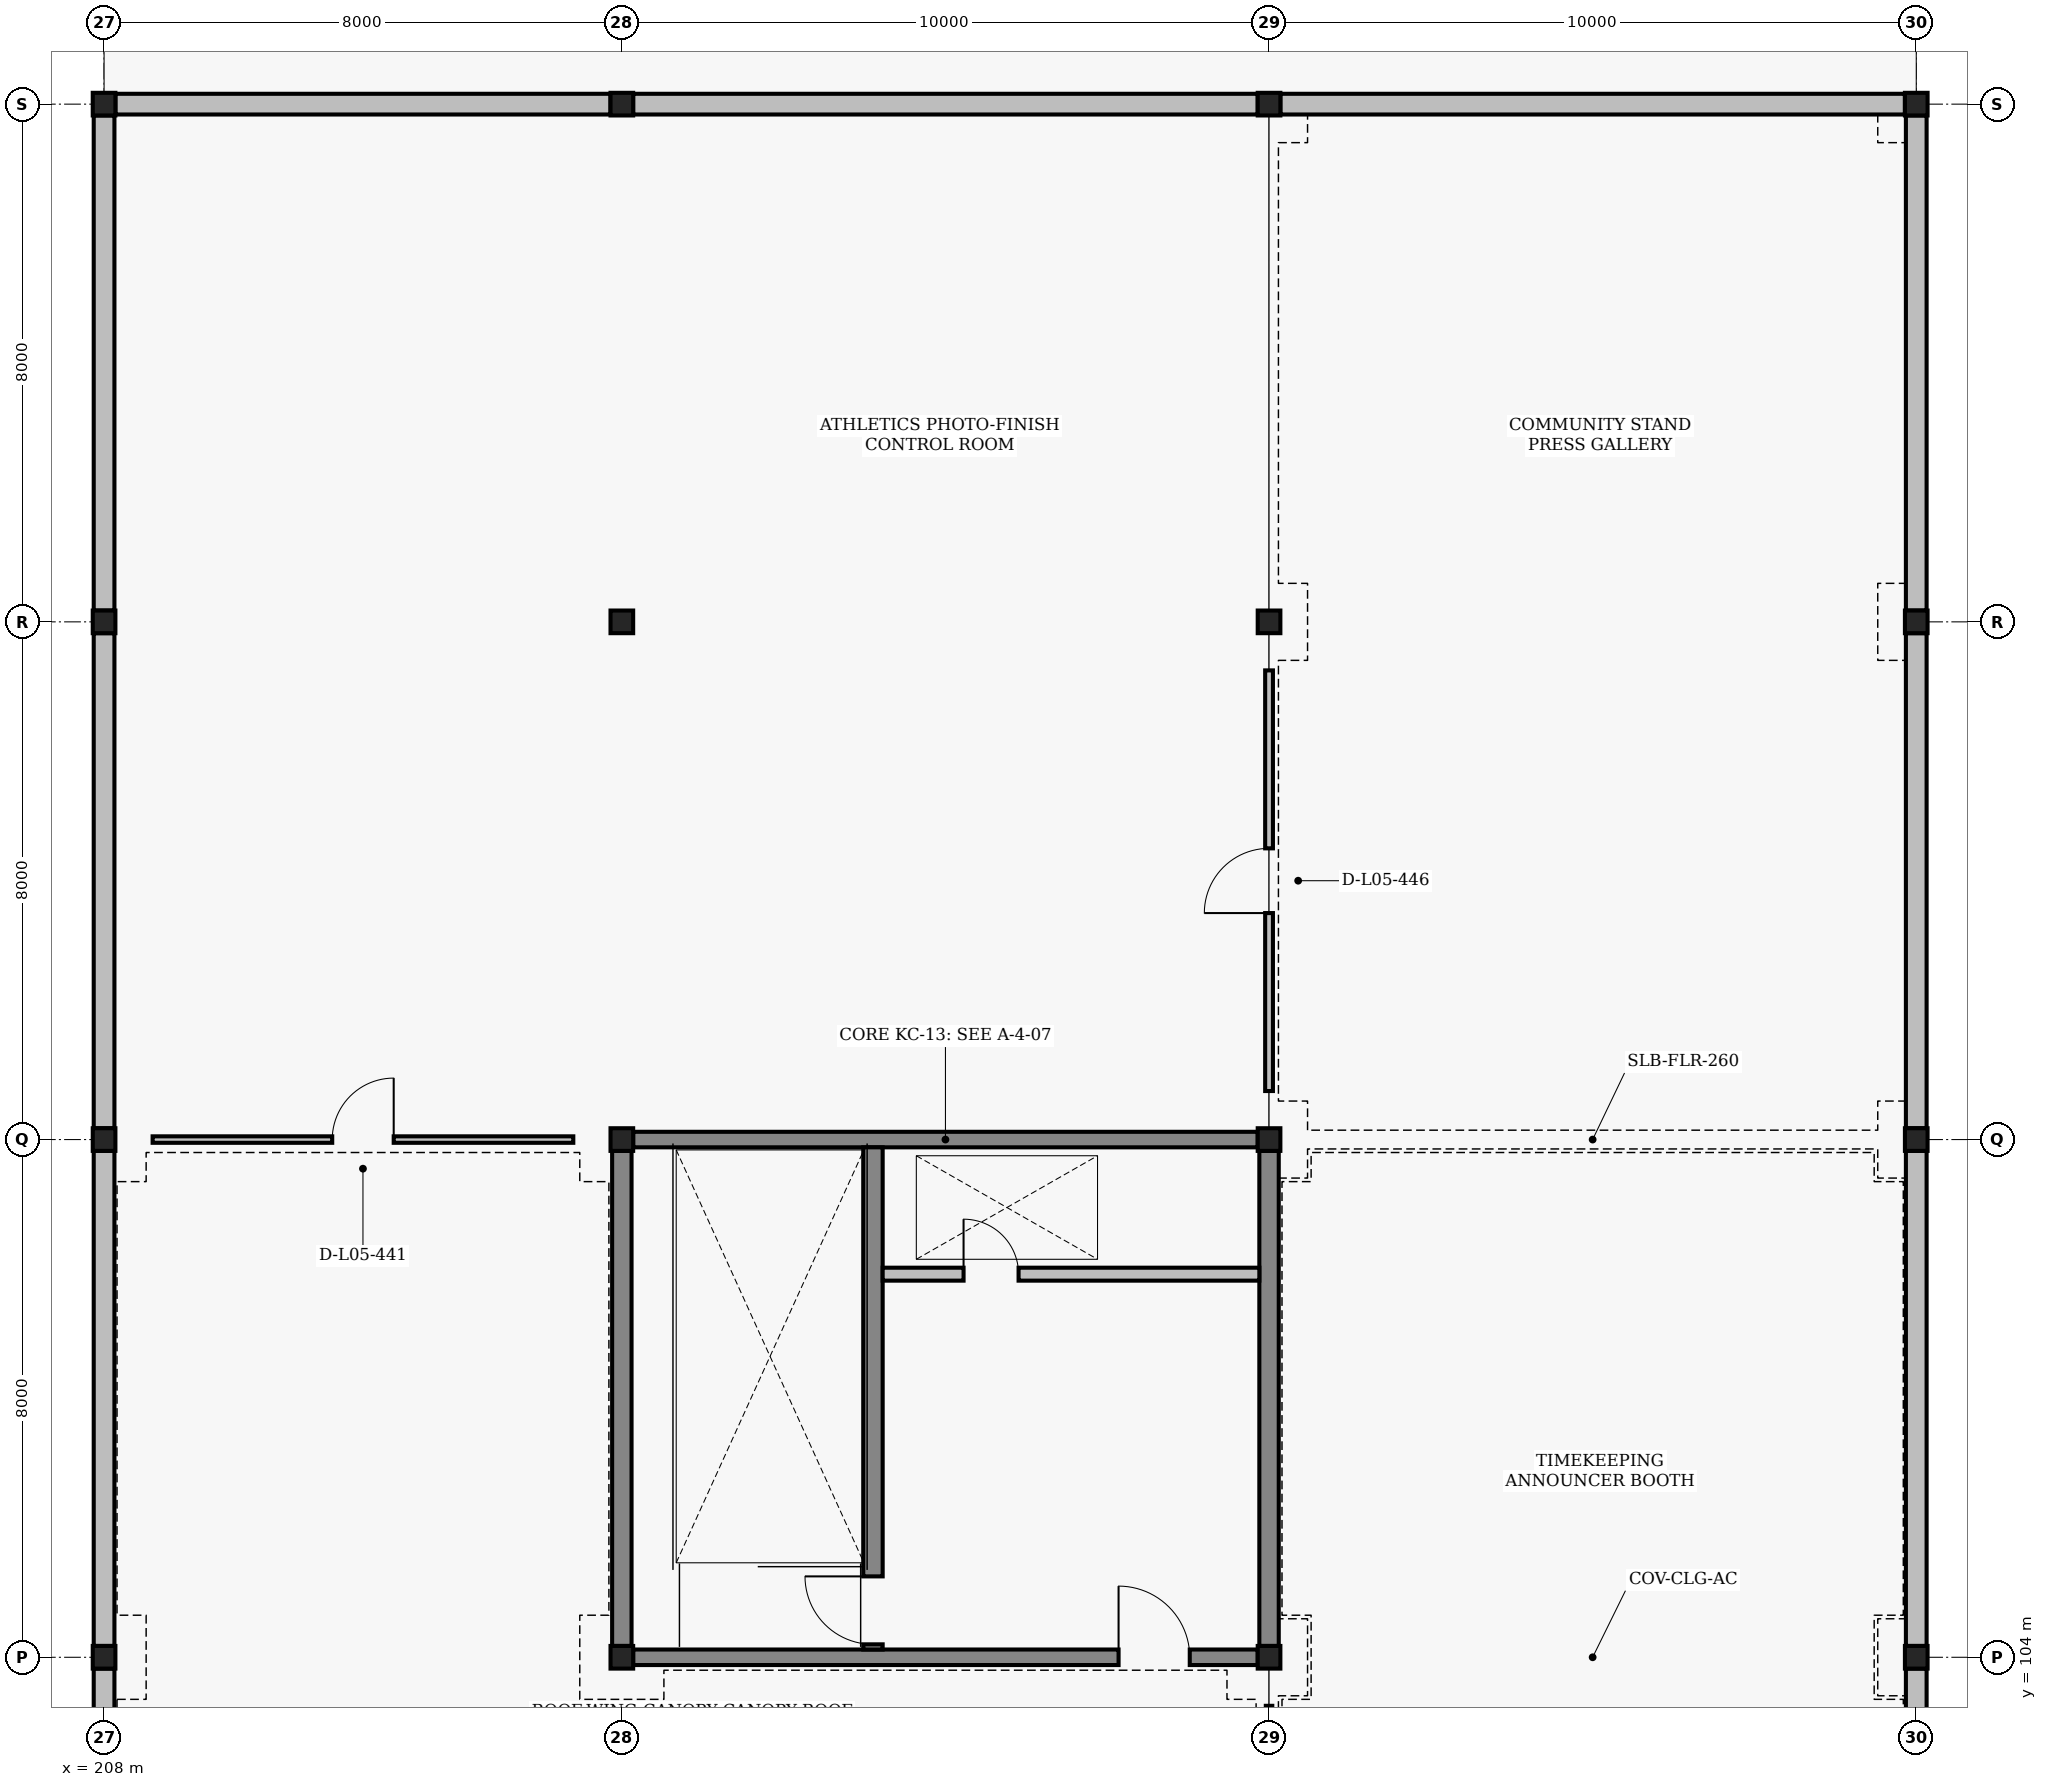
"""IFC4 building model, lengths in metres.
Left out: names, types, materials, properties, quantities, classifications, styles, units other than length and angle.
Written with IfcOpenShell. Run it as: python <this file> out.ifc"""

import sys

from ifc_helpers import new_model, si_unit, direction, frame, frame_2d, origin, origin_2d, place, context, subcontext, project, spatial, rectangle, hollow_rectangle, extrude, element, fill, save


model = new_model("IFC4")
c1 = context("Model", 3, precision=1e-05, world=origin(), true_north=direction((0.0, 1.0)))
c2 = subcontext(c1, "Body", "Model", "MODEL_VIEW")
j1 = project(units=[si_unit("LENGTHUNIT", "METRE"), si_unit("PLANEANGLEUNIT", "RADIAN")], contexts=[c1])
p1 = place(None, origin())
s1 = spatial("IfcSite", under=j1, at=p1, CompositionType="ELEMENT")
p2 = place(p1, origin())
s2 = spatial("IfcBuilding", under=s1, at=p2, CompositionType="ELEMENT")
p3 = place(p2, frame((0.0, 0.0, 18.6)))
s3 = spatial("IfcBuildingStorey", under=s2, at=p3, CompositionType="ELEMENT", Elevation=18.6)
for number, where, z_axis, x_axis in (
    (1, (208.0, 104.0, 0.0), (0.0, 0.0, 1.0), (1.0, 0.0, 0.0)),
    (2, (208.0, 112.0, 0.0), (0.0, 0.0, 1.0), (1.0, 0.0, 0.0)),
    (3, (208.0, 120.0, 0.0), (0.0, 0.0, 1.0), (1.0, 0.0, 0.0)),
    (4, (208.0, 128.0, 0.0), (0.0, 0.0, 1.0), (1.0, 0.0, 0.0)),
    (5, (216.0, 104.0, 0.0), (0.0, 0.0, 1.0), (1.0, 0.0, 0.0)),
    (6, (216.0, 112.0, 0.0), (0.0, 0.0, 1.0), (1.0, 0.0, 0.0)),
    (7, (216.0, 120.0, 0.0), (0.0, 0.0, 1.0), (1.0, 0.0, 0.0)),
    (8, (216.0, 128.0, 0.0), (0.0, 0.0, 1.0), (1.0, 0.0, 0.0)),
    (9, (226.0, 104.0, 0.0), (0.0, 0.0, 1.0), (1.0, 0.0, 0.0)),
    (10, (226.0, 112.0, 0.0), (0.0, 0.0, 1.0), (1.0, 0.0, 0.0)),
    (11, (226.0, 120.0, 0.0), (0.0, 0.0, 1.0), (1.0, 0.0, 0.0)),
    (12, (226.0, 128.0, 0.0), (0.0, 0.0, 1.0), (1.0, 0.0, 0.0)),
    (13, (236.0, 104.0, 0.0), (0.0, 0.0, 1.0), (1.0, 0.0, 0.0)),
    (14, (236.0, 112.0, 0.0), (0.0, 0.0, 1.0), (1.0, 0.0, 0.0)),
    (15, (236.0, 120.0, 0.0), (0.0, 0.0, 1.0), (1.0, 0.0, 0.0)),
    (16, (236.0, 128.0, 0.0), (0.0, 0.0, 1.0), (1.0, 0.0, 0.0)),
):
    element("IfcColumn", number, at=place(p3, frame(where, z_axis=z_axis, x_axis=x_axis)), inside=s3, PredefinedType="COLUMN", context=c2, shape_type="SweptSolid", body=[
        extrude(hollow_rectangle(XDim=0.35, YDim=0.35, WallThickness=0.016, at=origin_2d()), origin(), (0.0, 0.0, 1.0), 4.2),
    ])
for number, where, z_axis, x_axis in (
    (17, (208.0, 96.175, 0.0), (0.0, 0.0, 1.0), (0.0, 1.0, 0.0)),
    (18, (208.0, 104.175, 0.0), (0.0, 0.0, 1.0), (0.0, 1.0, 0.0)),
    (19, (208.0, 112.175, 0.0), (0.0, 0.0, 1.0), (0.0, 1.0, 0.0)),
    (20, (208.175, 128.0, 0.0), (0.0, 0.0, 1.0), (1.0, 0.0, 0.0)),
    (21, (208.0, 120.175, 0.0), (0.0, 0.0, 1.0), (0.0, 1.0, 0.0)),
):
    element("IfcWall", number, at=place(p3, frame(where, z_axis=z_axis, x_axis=x_axis)), inside=s3, PredefinedType="SOLIDWALL", context=c2, shape_type="SweptSolid", body=[
        extrude(rectangle(XDim=7.65, YDim=0.32, at=frame_2d((3.825, 0.0))), origin(), (0.0, 0.0, 1.0), 3.35),
    ])
p4 = place(p3, frame((216.175, 128.0, 0.0), z_axis=(0.0, 0.0, 1.0), x_axis=(1.0, 0.0, 0.0)))
e22 = element("IfcWall", 22, at=p4, inside=s3, PredefinedType="SOLIDWALL", context=c2, shape_type="SweptSolid", body=[
    extrude(rectangle(XDim=9.65, YDim=0.32, at=frame_2d((4.825, 0.0))), origin(), (0.0, 0.0, 1.0), 3.35),
])
for number, where, z_axis, x_axis in (
    (23, (236.0, 96.175, 0.0), (0.0, 0.0, 1.0), (0.0, 1.0, 0.0)),
    (24, (236.0, 104.175, 0.0), (0.0, 0.0, 1.0), (0.0, 1.0, 0.0)),
    (25, (236.0, 112.175, 0.0), (0.0, 0.0, 1.0), (0.0, 1.0, 0.0)),
):
    element("IfcWall", number, at=place(p3, frame(where, z_axis=z_axis, x_axis=x_axis)), inside=s3, PredefinedType="SOLIDWALL", context=c2, shape_type="SweptSolid", body=[
        extrude(rectangle(XDim=7.65, YDim=0.32, at=frame_2d((3.825, 0.0))), origin(), (0.0, 0.0, 1.0), 3.27),
    ])
p5 = place(p3, frame((226.175, 128.0, 0.0), z_axis=(0.0, 0.0, 1.0), x_axis=(1.0, 0.0, 0.0)))
e26 = element("IfcWall", 26, at=p5, inside=s3, PredefinedType="SOLIDWALL", context=c2, shape_type="SweptSolid", body=[
    extrude(rectangle(XDim=9.65, YDim=0.32, at=frame_2d((4.825, 0.0))), origin(), (0.0, 0.0, 1.0), 3.35),
])
p6 = place(p3, frame((236.0, 120.175, 0.0), z_axis=(0.0, 0.0, 1.0), x_axis=(0.0, 1.0, 0.0)))
e27 = element("IfcWall", 27, at=p6, inside=s3, PredefinedType="SOLIDWALL", context=c2, shape_type="SweptSolid", body=[
    extrude(rectangle(XDim=7.65, YDim=0.32, at=frame_2d((3.825, 0.0))), origin(), (0.0, 0.0, 1.0), 3.27),
])
p7 = place(p3, frame((216.175, 104.0, 0.0), z_axis=(0.0, 0.0, 1.0), x_axis=(1.0, 0.0, 0.0)))
e28 = element("IfcWall", 28, at=p7, inside=s3, PredefinedType="SHEAR", context=c2, shape_type="SweptSolid", body=[
    extrude(rectangle(XDim=9.65, YDim=0.24, at=frame_2d((4.825, 0.0))), origin(), (0.0, 0.0, 1.0), 3.27),
])
p8 = place(p7, frame((7.5, 0.0, 0.0)))
e29 = element("IfcOpeningElement", 29, at=p8, cuts=e28, PredefinedType="OPENING", context=c2, shape_type="SweptSolid", body=[
    extrude(rectangle(XDim=1.1, YDim=2.2, at=frame_2d((0.55, 1.1))), frame((0.0, 0.13, 0.0), z_axis=(0.0, -1.0, 0.0), x_axis=(1.0, 0.0, 0.0)), (0.0, 0.0, 1.0), 0.26),
])
p9 = place(p3, frame((216.175, 112.0, 0.0), z_axis=(0.0, 0.0, 1.0), x_axis=(1.0, 0.0, 0.0)))
e30 = element("IfcWall", 30, at=p9, inside=s3, PredefinedType="SHEAR", context=c2, shape_type="SweptSolid", body=[
    extrude(rectangle(XDim=9.65, YDim=0.24, at=frame_2d((4.825, 0.0))), origin(), (0.0, 0.0, 1.0), 3.27),
])
p10 = place(p3, frame((216.0, 104.175, 0.0), z_axis=(0.0, 0.0, 1.0), x_axis=(0.0, 1.0, 0.0)))
e31 = element("IfcWall", 31, at=p10, inside=s3, PredefinedType="SHEAR", context=c2, shape_type="SweptSolid", body=[
    extrude(rectangle(XDim=7.65, YDim=0.3, at=frame_2d((3.825, 0.0))), origin(), (0.0, 0.0, 1.0), 3.37),
])
p11 = place(p3, frame((226.0, 104.175, 0.0), z_axis=(0.0, 0.0, 1.0), x_axis=(0.0, 1.0, 0.0)))
e32 = element("IfcWall", 32, at=p11, inside=s3, PredefinedType="SHEAR", context=c2, shape_type="SweptSolid", body=[
    extrude(rectangle(XDim=7.65, YDim=0.3, at=frame_2d((3.825, 0.0))), origin(), (0.0, 0.0, 1.0), 3.27),
])
p12 = place(p3, frame((219.88, 104.12, 0.0), z_axis=(0.0, 0.0, 1.0), x_axis=(0.0, 1.0, 0.0)))
e33 = element("IfcWall", 33, at=p12, inside=s3, PredefinedType="SHEAR", context=c2, shape_type="SweptSolid", body=[
    extrude(rectangle(XDim=7.76, YDim=0.3, at=frame_2d((3.88, 0.0))), origin(), (0.0, 0.0, 1.0), 3.47),
])
p13 = place(p12, frame((0.08, 0.0, 0.0)))
e34 = element("IfcOpeningElement", 34, at=p13, cuts=e33, PredefinedType="OPENING", context=c2, shape_type="SweptSolid", body=[
    extrude(rectangle(XDim=1.05, YDim=2.15, at=frame_2d((0.525, 1.075))), frame((0.0, 0.16, 0.0), z_axis=(0.0, -1.0, 0.0), x_axis=(1.0, 0.0, 0.0)), (0.0, 0.0, 1.0), 0.32),
])
p14 = place(p3, frame((220.03, 109.92, 0.0), z_axis=(0.0, 0.0, 1.0), x_axis=(1.0, 0.0, 0.0)))
e35 = element("IfcWall", 35, at=p14, inside=s3, PredefinedType="PARTITIONING", context=c2, shape_type="SweptSolid", body=[
    extrude(rectangle(XDim=5.82, YDim=0.2, at=frame_2d((2.91, 0.0))), origin(), (0.0, 0.0, 1.0), 3.37),
])
p15 = place(p14, frame((1.25, 0.0, 0.0)))
e36 = element("IfcOpeningElement", 36, at=p15, cuts=e35, PredefinedType="OPENING", context=c2, shape_type="SweptSolid", body=[
    extrude(rectangle(XDim=0.85, YDim=2.05, at=frame_2d((0.425, 1.025))), frame((0.0, 0.11, 0.0), z_axis=(0.0, -1.0, 0.0), x_axis=(1.0, 0.0, 0.0)), (0.0, 0.0, 1.0), 0.22),
])
p16 = place(p3, frame((208.75, 112.0, 0.0), z_axis=(0.0, 0.0, 1.0), x_axis=(1.0, 0.0, 0.0)))
e37 = element("IfcWall", 37, at=p16, inside=s3, PredefinedType="PARTITIONING", context=c2, shape_type="SweptSolid", body=[
    extrude(rectangle(XDim=6.5, YDim=0.1, at=frame_2d((3.25, 0.0))), origin(), (0.0, 0.0, 1.0), 3.47),
])
p17 = place(p16, frame((2.775, 0.0, 0.0)))
e38 = element("IfcOpeningElement", 38, at=p17, cuts=e37, PredefinedType="OPENING", context=c2, shape_type="SweptSolid", body=[
    extrude(rectangle(XDim=0.95, YDim=2.1, at=frame_2d((0.475, 1.05))), frame((0.0, 0.06, 0.0), z_axis=(0.0, -1.0, 0.0), x_axis=(1.0, 0.0, 0.0)), (0.0, 0.0, 1.0), 0.12),
])
p18 = place(p3, frame((226.0, 96.75, 0.0), z_axis=(0.0, 0.0, 1.0), x_axis=(0.0, 1.0, 0.0)))
e39 = element("IfcWall", 39, at=p18, inside=s3, PredefinedType="PARTITIONING", context=c2, shape_type="SweptSolid", body=[
    extrude(rectangle(XDim=6.5, YDim=0.1, at=frame_2d((3.25, 0.0))), origin(), (0.0, 0.0, 1.0), 3.37),
])
p19 = place(p18, frame((2.775, 0.0, 0.0)))
e40 = element("IfcOpeningElement", 40, at=p19, cuts=e39, PredefinedType="OPENING", context=c2, shape_type="SweptSolid", body=[
    extrude(rectangle(XDim=0.95, YDim=2.1, at=frame_2d((0.475, 1.05))), frame((0.0, 0.06, 0.0), z_axis=(0.0, -1.0, 0.0), x_axis=(1.0, 0.0, 0.0)), (0.0, 0.0, 1.0), 0.12),
])
p20 = place(p3, frame((226.0, 112.75, 0.0), z_axis=(0.0, 0.0, 1.0), x_axis=(0.0, 1.0, 0.0)))
e41 = element("IfcWall", 41, at=p20, inside=s3, PredefinedType="PARTITIONING", context=c2, shape_type="SweptSolid", body=[
    extrude(rectangle(XDim=6.5, YDim=0.12, at=frame_2d((3.25, 0.0))), origin(), (0.0, 0.0, 1.0), 3.37),
])
p21 = place(p20, frame((2.75, 0.0, 0.0)))
e42 = element("IfcOpeningElement", 42, at=p21, cuts=e41, PredefinedType="OPENING", context=c2, shape_type="SweptSolid", body=[
    extrude(rectangle(XDim=1.0, YDim=2.1, at=frame_2d((0.5, 1.05))), frame((0.0, 0.07, 0.0), z_axis=(0.0, -1.0, 0.0), x_axis=(1.0, 0.0, 0.0)), (0.0, 0.0, 1.0), 0.14),
])
p22 = place(p8, origin())
e43 = element("IfcDoor", 43, at=p22, inside=s3, OperationType="SINGLE_SWING_LEFT", PredefinedType="DOOR", context=c2, shape_type="SweptSolid", body=[
    extrude(rectangle(XDim=1.1, YDim=2.2, at=frame_2d((0.55, 1.1))), frame((0.0, 0.025, 0.0), z_axis=(0.0, -1.0, 0.0), x_axis=(1.0, 0.0, 0.0)), (0.0, 0.0, 1.0), 0.05),
])
fill(e29, e43)
p23 = place(p13, origin())
e44 = element("IfcDoor", 44, at=p23, inside=s3, OperationType="SINGLE_SWING_RIGHT", PredefinedType="DOOR", context=c2, shape_type="SweptSolid", body=[
    extrude(rectangle(XDim=1.05, YDim=2.15, at=frame_2d((0.525, 1.075))), frame((0.0, 0.025, 0.0), z_axis=(0.0, -1.0, 0.0), x_axis=(1.0, 0.0, 0.0)), (0.0, 0.0, 1.0), 0.05),
])
fill(e34, e44)
p24 = place(p15, origin())
e45 = element("IfcDoor", 45, at=p24, inside=s3, OperationType="SINGLE_SWING_LEFT", PredefinedType="TRAPDOOR", context=c2, shape_type="SweptSolid", body=[
    extrude(rectangle(XDim=0.85, YDim=2.05, at=frame_2d((0.425, 1.025))), frame((0.0, 0.025, 0.0), z_axis=(0.0, -1.0, 0.0), x_axis=(1.0, 0.0, 0.0)), (0.0, 0.0, 1.0), 0.05),
])
fill(e36, e45)
p25 = place(p17, origin())
e46 = element("IfcDoor", 46, at=p25, inside=s3, OperationType="SINGLE_SWING_RIGHT", PredefinedType="DOOR", context=c2, shape_type="SweptSolid", body=[
    extrude(rectangle(XDim=0.95, YDim=2.1, at=frame_2d((0.475, 1.05))), frame((0.0, 0.025, 0.0), z_axis=(0.0, -1.0, 0.0), x_axis=(1.0, 0.0, 0.0)), (0.0, 0.0, 1.0), 0.05),
])
fill(e38, e46)
p26 = place(p21, origin())
e47 = element("IfcDoor", 47, at=p26, inside=s3, OperationType="SINGLE_SWING_LEFT", PredefinedType="DOOR", context=c2, shape_type="SweptSolid", body=[
    extrude(rectangle(XDim=1.0, YDim=2.1, at=frame_2d((0.5, 1.05))), frame((0.0, 0.025, 0.0), z_axis=(0.0, -1.0, 0.0), x_axis=(1.0, 0.0, 0.0)), (0.0, 0.0, 1.0), 0.05),
])
fill(e42, e47)
save(model, sys.argv[1])
